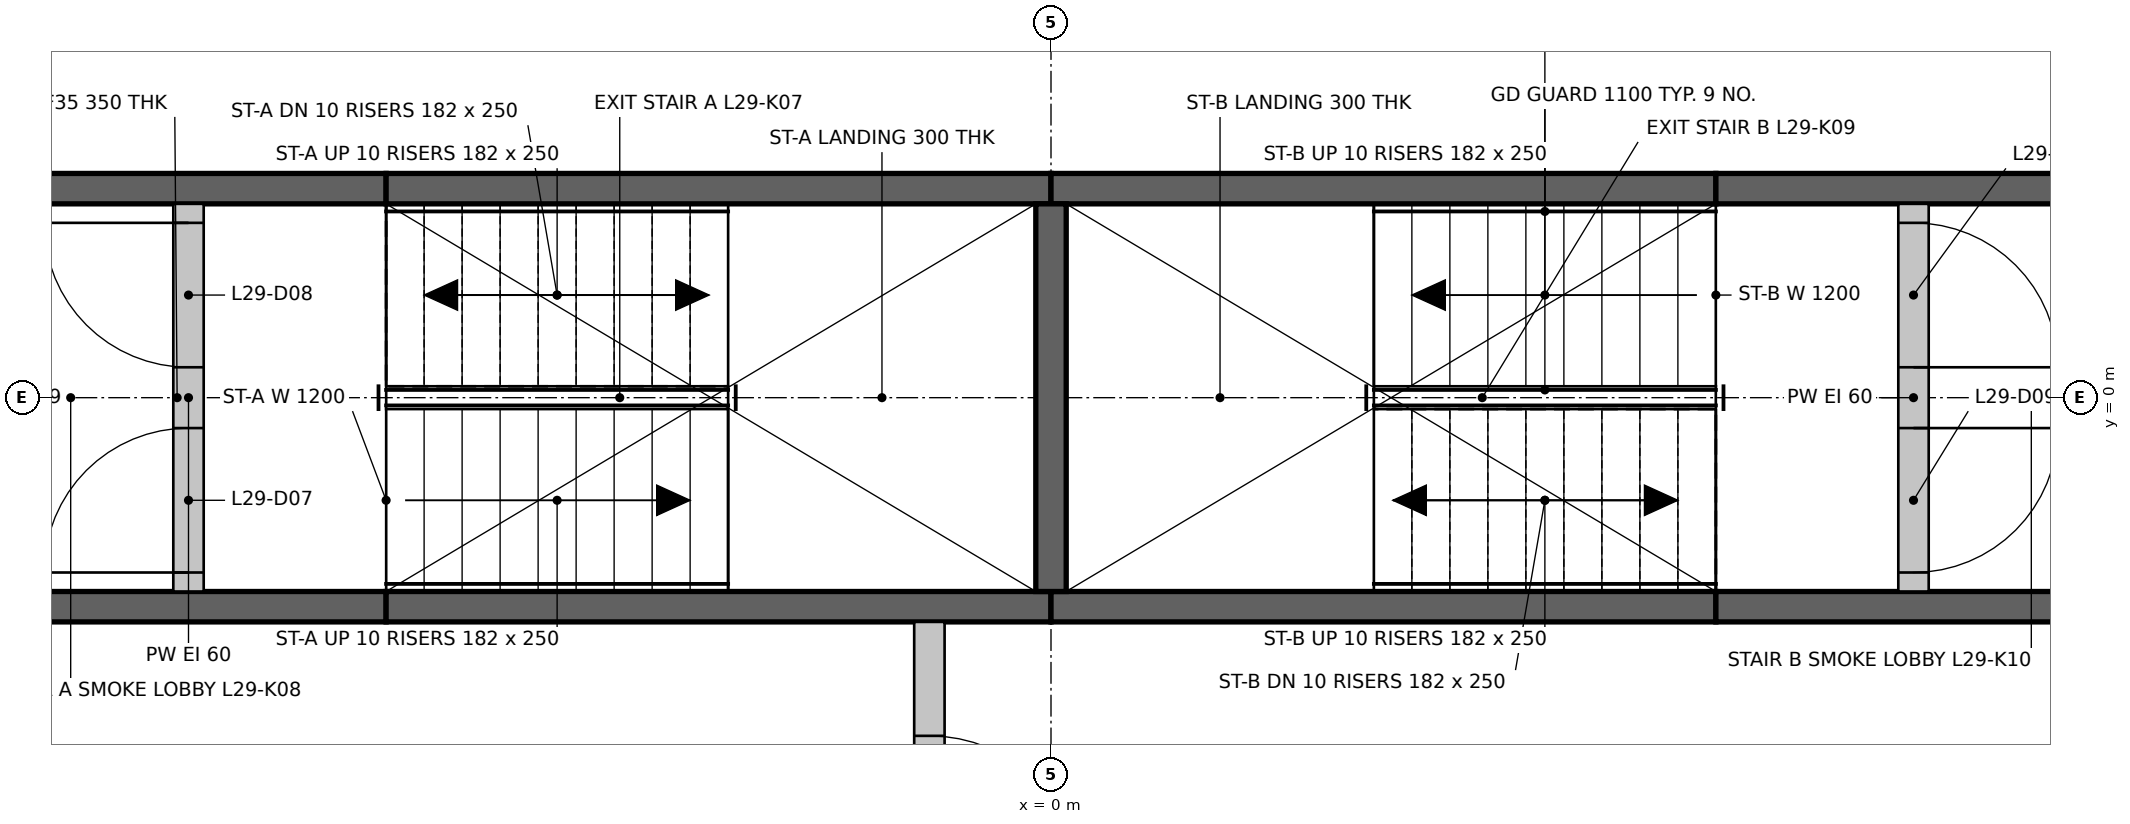
"""IFC4 building model, lengths in metres.
Left out: names, types, materials, properties, quantities, classifications, styles, units other than length and angle.
Written with IfcOpenShell. Run it as: python <this file> out.ifc"""

import sys

from ifc_helpers import new_model, si_unit, direction, frame, frame_2d, origin, place, context, subcontext, project, spatial, rectangle, extrude, element, fill, save


model = new_model("IFC4")
c1 = context("Model", 3, precision=1e-05, world=origin(), true_north=direction((0.0, 1.0)))
c2 = subcontext(c1, "Body", "Model", "MODEL_VIEW")
j1 = project(units=[si_unit("LENGTHUNIT", "METRE"), si_unit("PLANEANGLEUNIT", "RADIAN")], contexts=[c1])
p1 = place(None, origin())
s1 = spatial("IfcSite", under=j1, at=p1, CompositionType="ELEMENT")
p2 = place(p1, origin())
s2 = spatial("IfcBuilding", under=s1, at=p2, CompositionType="ELEMENT")
p3 = place(p2, frame((0.0, 0.0, 112.9)))
s3 = spatial("IfcBuildingStorey", under=s2, at=p3, CompositionType="ELEMENT", Elevation=112.9)
p4 = place(p3, frame((-7.124, -1.375, 0.0), z_axis=(0.0, 0.0, 1.0), x_axis=(1.0, 0.0, 0.0)))
e1 = element("IfcWall", 1, at=p4, inside=s3, PredefinedType="SHEAR", context=c2, shape_type="SweptSolid", body=[
    extrude(rectangle(XDim=2.75, YDim=0.2, at=frame_2d((1.375, 0.0))), origin(), (0.0, 0.0, 1.0), 3.3),
])
for number, where, z_axis, x_axis in (
    (2, (-4.374, -1.375, 0.0), (0.0, 0.0, 1.0), (1.0, 0.0, 0.0)),
    (3, (0.0, -1.375, 0.0), (0.0, 0.0, 1.0), (1.0, 0.0, 0.0)),
):
    element("IfcWall", number, at=place(p3, frame(where, z_axis=z_axis, x_axis=x_axis)), inside=s3, PredefinedType="SHEAR", context=c2, shape_type="SweptSolid", body=[
        extrude(rectangle(XDim=4.374, YDim=0.2, at=frame_2d((2.187, 0.0))), origin(), (0.0, 0.0, 1.0), 3.3),
    ])
for number, where, z_axis, x_axis in (
    (4, (4.374, -1.375, 0.0), (0.0, 0.0, 1.0), (1.0, 0.0, 0.0)),
    (5, (-7.124, 1.375, 0.0), (0.0, 0.0, 1.0), (1.0, 0.0, 0.0)),
):
    element("IfcWall", number, at=place(p3, frame(where, z_axis=z_axis, x_axis=x_axis)), inside=s3, PredefinedType="SHEAR", context=c2, shape_type="SweptSolid", body=[
        extrude(rectangle(XDim=2.75, YDim=0.2, at=frame_2d((1.375, 0.0))), origin(), (0.0, 0.0, 1.0), 3.3),
    ])
for number, where, z_axis, x_axis in (
    (6, (-4.374, 1.375, 0.0), (0.0, 0.0, 1.0), (1.0, 0.0, 0.0)),
    (7, (0.0, 1.375, 0.0), (0.0, 0.0, 1.0), (1.0, 0.0, 0.0)),
):
    element("IfcWall", number, at=place(p3, frame(where, z_axis=z_axis, x_axis=x_axis)), inside=s3, PredefinedType="SHEAR", context=c2, shape_type="SweptSolid", body=[
        extrude(rectangle(XDim=4.374, YDim=0.2, at=frame_2d((2.187, 0.0))), origin(), (0.0, 0.0, 1.0), 3.3),
    ])
p5 = place(p3, frame((4.374, 1.375, 0.0), z_axis=(0.0, 0.0, 1.0), x_axis=(1.0, 0.0, 0.0)))
e8 = element("IfcWall", 8, at=p5, inside=s3, PredefinedType="SHEAR", context=c2, shape_type="SweptSolid", body=[
    extrude(rectangle(XDim=2.75, YDim=0.2, at=frame_2d((1.375, 0.0))), origin(), (0.0, 0.0, 1.0), 3.3),
])
p6 = place(p3, frame((0.0, -1.275, 0.0), z_axis=(0.0, 0.0, 1.0), x_axis=(0.0, 1.0, 0.0)))
e9 = element("IfcWall", 9, at=p6, inside=s3, PredefinedType="SHEAR", context=c2, shape_type="SweptSolid", body=[
    extrude(rectangle(XDim=2.55, YDim=0.2, at=frame_2d((1.275, 0.0))), origin(), (0.0, 0.0, 1.0), 3.3),
])
p7 = place(p3, frame((-0.8, -3.974, 0.0), z_axis=(0.0, 0.0, 1.0), x_axis=(0.0, 1.0, 0.0)))
e10 = element("IfcWall", 10, at=p7, inside=s3, PredefinedType="PARTITIONING", context=c2, shape_type="SweptSolid", body=[
    extrude(rectangle(XDim=2.499, YDim=0.2, at=frame_2d((1.25, 0.0))), origin(), (0.0, 0.0, 1.0), 3.3),
])
p8 = place(p7, frame((0.75, 0.0, 0.0)))
e11 = element("IfcOpeningElement", 11, at=p8, cuts=e10, PredefinedType="OPENING", context=c2, shape_type="SweptSolid", body=[
    extrude(rectangle(XDim=1.0, YDim=2.1, at=frame_2d((0.5, 1.05))), frame((0.0, 0.11, 0.0), z_axis=(0.0, -1.0, 0.0), x_axis=(1.0, 0.0, 0.0)), (0.0, 0.0, 1.0), 0.22),
])
p9 = place(p3, frame((-5.674, -1.275, 0.0), z_axis=(0.0, 0.0, 1.0), x_axis=(0.0, 1.0, 0.0)))
e12 = element("IfcWall", 12, at=p9, inside=s3, PredefinedType="PARTITIONING", context=c2, shape_type="SweptSolid", body=[
    extrude(rectangle(XDim=2.55, YDim=0.2, at=frame_2d((1.275, 0.0))), origin(), (0.0, 0.0, 1.0), 3.3),
])
p10 = place(p9, frame((0.125, 0.0, 0.0)))
e13 = element("IfcOpeningElement", 13, at=p10, cuts=e12, PredefinedType="OPENING", context=c2, shape_type="SweptSolid", body=[
    extrude(rectangle(XDim=0.95, YDim=2.1, at=frame_2d((0.475, 1.05))), frame((0.0, 0.11, 0.0), z_axis=(0.0, -1.0, 0.0), x_axis=(1.0, 0.0, 0.0)), (0.0, 0.0, 1.0), 0.22),
])
p11 = place(p9, frame((1.475, 0.0, 0.0)))
e14 = element("IfcOpeningElement", 14, at=p11, cuts=e12, PredefinedType="OPENING", context=c2, shape_type="SweptSolid", body=[
    extrude(rectangle(XDim=0.95, YDim=2.1, at=frame_2d((0.475, 1.05))), frame((0.0, 0.11, 0.0), z_axis=(0.0, -1.0, 0.0), x_axis=(1.0, 0.0, 0.0)), (0.0, 0.0, 1.0), 0.22),
])
p12 = place(p3, frame((5.674, -1.275, 0.0), z_axis=(0.0, 0.0, 1.0), x_axis=(0.0, 1.0, 0.0)))
e15 = element("IfcWall", 15, at=p12, inside=s3, PredefinedType="PARTITIONING", context=c2, shape_type="SweptSolid", body=[
    extrude(rectangle(XDim=2.55, YDim=0.2, at=frame_2d((1.275, 0.0))), origin(), (0.0, 0.0, 1.0), 3.3),
])
p13 = place(p12, frame((0.125, 0.0, 0.0)))
e16 = element("IfcOpeningElement", 16, at=p13, cuts=e15, PredefinedType="OPENING", context=c2, shape_type="SweptSolid", body=[
    extrude(rectangle(XDim=0.95, YDim=2.1, at=frame_2d((0.475, 1.05))), frame((0.0, 0.11, 0.0), z_axis=(0.0, -1.0, 0.0), x_axis=(1.0, 0.0, 0.0)), (0.0, 0.0, 1.0), 0.22),
])
p14 = place(p12, frame((1.475, 0.0, 0.0)))
e17 = element("IfcOpeningElement", 17, at=p14, cuts=e15, PredefinedType="OPENING", context=c2, shape_type="SweptSolid", body=[
    extrude(rectangle(XDim=0.95, YDim=2.1, at=frame_2d((0.475, 1.05))), frame((0.0, 0.11, 0.0), z_axis=(0.0, -1.0, 0.0), x_axis=(1.0, 0.0, 0.0)), (0.0, 0.0, 1.0), 0.22),
])
p15 = place(p10, origin())
e18 = element("IfcDoor", 18, at=p15, inside=s3, OperationType="SINGLE_SWING_LEFT", PredefinedType="DOOR", context=c2, shape_type="SweptSolid", body=[
    extrude(rectangle(XDim=0.95, YDim=2.1, at=frame_2d((0.475, 1.05))), frame((0.0, 0.025, 0.0), z_axis=(0.0, -1.0, 0.0), x_axis=(1.0, 0.0, 0.0)), (0.0, 0.0, 1.0), 0.05),
])
fill(e13, e18)
p16 = place(p11, origin())
e19 = element("IfcDoor", 19, at=p16, inside=s3, OperationType="SINGLE_SWING_RIGHT", PredefinedType="DOOR", context=c2, shape_type="SweptSolid", body=[
    extrude(rectangle(XDim=0.95, YDim=2.1, at=frame_2d((0.475, 1.05))), frame((0.0, 0.025, 0.0), z_axis=(0.0, -1.0, 0.0), x_axis=(1.0, 0.0, 0.0)), (0.0, 0.0, 1.0), 0.05),
])
fill(e14, e19)
p17 = place(p13, frame((0.95, 0.0, 0.0), z_axis=(0.0, 0.0, 1.0), x_axis=(-1.0, 0.0, 0.0)))
e20 = element("IfcDoor", 20, at=p17, inside=s3, OperationType="SINGLE_SWING_RIGHT", PredefinedType="DOOR", context=c2, shape_type="SweptSolid", body=[
    extrude(rectangle(XDim=0.95, YDim=2.1, at=frame_2d((0.475, 1.05))), frame((0.0, 0.025, 0.0), z_axis=(0.0, -1.0, 0.0), x_axis=(1.0, 0.0, 0.0)), (0.0, 0.0, 1.0), 0.05),
])
fill(e16, e20)
p18 = place(p14, frame((0.95, 0.0, 0.0), z_axis=(0.0, 0.0, 1.0), x_axis=(-1.0, 0.0, 0.0)))
e21 = element("IfcDoor", 21, at=p18, inside=s3, OperationType="SINGLE_SWING_LEFT", PredefinedType="DOOR", context=c2, shape_type="SweptSolid", body=[
    extrude(rectangle(XDim=0.95, YDim=2.1, at=frame_2d((0.475, 1.05))), frame((0.0, 0.025, 0.0), z_axis=(0.0, -1.0, 0.0), x_axis=(1.0, 0.0, 0.0)), (0.0, 0.0, 1.0), 0.05),
])
fill(e17, e21)
p19 = place(p8, frame((1.0, 0.0, 0.0), z_axis=(0.0, 0.0, 1.0), x_axis=(-1.0, 0.0, 0.0)))
e22 = element("IfcDoor", 22, at=p19, inside=s3, OperationType="SINGLE_SWING_LEFT", PredefinedType="DOOR", context=c2, shape_type="SweptSolid", body=[
    extrude(rectangle(XDim=1.0, YDim=2.1, at=frame_2d((0.5, 1.05))), frame((0.0, 0.025, 0.0), z_axis=(0.0, -1.0, 0.0), x_axis=(1.0, 0.0, 0.0)), (0.0, 0.0, 1.0), 0.05),
])
fill(e11, e22)
save(model, sys.argv[1])
